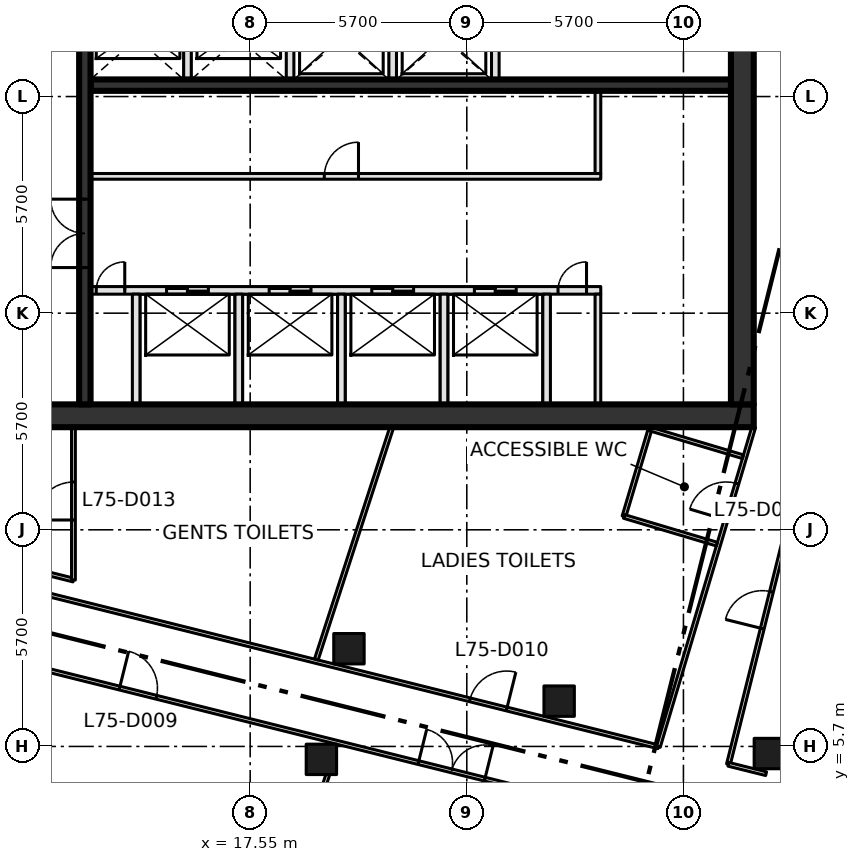
"""IFC4 building model, lengths in metres.
Left out: names, types, materials, properties, quantities, classifications, styles, units other than length and angle.
Written with IfcOpenShell. Run it as: python <this file> out.ifc"""

import sys

from ifc_helpers import new_model, si_unit, direction, frame, frame_2d, origin, origin_2d, place, context, subcontext, project, spatial, rectangle, extrude, element, fill, save


model = new_model("IFC4")
c1 = context("Model", 3, precision=1e-05, world=origin(), true_north=direction((0.0, 1.0)))
c2 = subcontext(c1, "Body", "Model", "MODEL_VIEW")
j1 = project(units=[si_unit("LENGTHUNIT", "METRE"), si_unit("PLANEANGLEUNIT", "RADIAN")], contexts=[c1])
p1 = place(None, origin())
s1 = spatial("IfcSite", under=j1, at=p1, CompositionType="ELEMENT")
p2 = place(p1, origin())
s2 = spatial("IfcBuilding", under=s1, at=p2, CompositionType="ELEMENT")
p3 = place(p2, frame((0.0, 0.0, 327.6)))
s3 = spatial("IfcBuildingStorey", under=s2, at=p3, CompositionType="ELEMENT", Elevation=327.6)
for number, where, z_axis, x_axis in (
    (1, (19.424, 5.36, 0.0), (0.0, 0.0, 1.0), (1.0, 0.0, 0.0)),
    (2, (20.149, 8.271, 0.0), (0.0, 0.0, 1.0), (1.0, 0.0, 0.0)),
    (3, (25.68, 6.892, 0.0), (0.0, 0.0, 1.0), (1.0, 0.0, 0.0)),
    (4, (31.211, 5.513, 0.0), (0.0, 0.0, 1.0), (1.0, 0.0, 0.0)),
):
    element("IfcColumn", number, at=place(p3, frame(where, z_axis=z_axis, x_axis=x_axis)), inside=s3, PredefinedType="COLUMN", context=c2, shape_type="SweptSolid", body=[
        extrude(rectangle(XDim=0.8, YDim=0.8, at=origin_2d()), origin(), (0.0, 0.0, 1.0), 4.2),
    ])
p4 = place(p3, frame((8.0, 14.4, -0.3), z_axis=(0.0, 0.0, 1.0), x_axis=(1.0, 0.0, 0.0)))
e5 = element("IfcWall", 5, at=p4, inside=s3, PredefinedType="SHEAR", context=c2, shape_type="SweptSolid", body=[
    extrude(rectangle(XDim=22.8, YDim=0.6, at=frame_2d((11.4, 0.0))), origin(), (0.0, 0.0, 1.0), 4.2),
])
p5 = place(p4, frame((2.3, 0.0, 0.3)))
e6 = element("IfcOpeningElement", 6, at=p5, cuts=e5, PredefinedType="OPENING", context=c2, shape_type="SweptSolid", body=[
    extrude(rectangle(XDim=1.8, YDim=2.1, at=frame_2d((0.9, 1.05))), frame((0.0, 0.31, 0.0), z_axis=(0.0, -1.0, 0.0), x_axis=(1.0, 0.0, 0.0)), (0.0, 0.0, 1.0), 0.62),
])
p6 = place(p3, frame((30.5, 14.7, -0.3), z_axis=(0.0, 0.0, 1.0), x_axis=(0.0, 1.0, 0.0)))
e7 = element("IfcWall", 7, at=p6, inside=s3, PredefinedType="SHEAR", context=c2, shape_type="SweptSolid", body=[
    extrude(rectangle(XDim=21.0, YDim=0.6, at=frame_2d((10.5, 0.0))), origin(), (0.0, 0.0, 1.0), 4.2),
])
p7 = place(p3, frame((13.35, 17.7, 0.0), z_axis=(0.0, 0.0, 1.0), x_axis=(1.0, 0.0, 0.0)))
e8 = element("IfcWall", 8, at=p7, inside=s3, PredefinedType="SOLIDWALL", context=c2, shape_type="SweptSolid", body=[
    extrude(rectangle(XDim=13.425, YDim=0.2, at=frame_2d((6.712, 0.0))), origin(), (0.0, 0.0, 1.0), 3.9),
])
p8 = place(p7, frame((2.0, 0.0, 0.0)))
e9 = element("IfcOpeningElement", 9, at=p8, cuts=e8, PredefinedType="OPENING", context=c2, shape_type="SweptSolid", body=[
    extrude(rectangle(XDim=1.1, YDim=2.1, at=frame_2d((0.55, 1.05))), frame((0.0, 0.11, 0.0), z_axis=(0.0, -1.0, 0.0), x_axis=(1.0, 0.0, 0.0)), (0.0, 0.0, 1.0), 0.22),
])
p9 = place(p7, frame((4.7, 0.0, 0.0)))
e10 = element("IfcOpeningElement", 10, at=p9, cuts=e8, PredefinedType="OPENING", context=c2, shape_type="SweptSolid", body=[
    extrude(rectangle(XDim=1.1, YDim=2.1, at=frame_2d((0.55, 1.05))), frame((0.0, 0.11, 0.0), z_axis=(0.0, -1.0, 0.0), x_axis=(1.0, 0.0, 0.0)), (0.0, 0.0, 1.0), 0.22),
])
p10 = place(p7, frame((7.4, 0.0, 0.0)))
e11 = element("IfcOpeningElement", 11, at=p10, cuts=e8, PredefinedType="OPENING", context=c2, shape_type="SweptSolid", body=[
    extrude(rectangle(XDim=1.1, YDim=2.1, at=frame_2d((0.55, 1.05))), frame((0.0, 0.11, 0.0), z_axis=(0.0, -1.0, 0.0), x_axis=(1.0, 0.0, 0.0)), (0.0, 0.0, 1.0), 0.22),
])
p11 = place(p7, frame((10.1, 0.0, 0.0)))
e12 = element("IfcOpeningElement", 12, at=p11, cuts=e8, PredefinedType="OPENING", context=c2, shape_type="SweptSolid", body=[
    extrude(rectangle(XDim=1.1, YDim=2.1, at=frame_2d((0.55, 1.05))), frame((0.0, 0.11, 0.0), z_axis=(0.0, -1.0, 0.0), x_axis=(1.0, 0.0, 0.0)), (0.0, 0.0, 1.0), 0.22),
])
p12 = place(p7, frame((0.15, 0.0, 0.0)))
e13 = element("IfcOpeningElement", 13, at=p12, cuts=e8, PredefinedType="OPENING", context=c2, shape_type="SweptSolid", body=[
    extrude(rectangle(XDim=0.75, YDim=2.1, at=frame_2d((0.375, 1.05))), frame((0.0, 0.11, 0.0), z_axis=(0.0, -1.0, 0.0), x_axis=(1.0, 0.0, 0.0)), (0.0, 0.0, 1.0), 0.22),
])
p13 = place(p7, frame((12.3, 0.0, 0.0)))
e14 = element("IfcOpeningElement", 14, at=p13, cuts=e8, PredefinedType="OPENING", context=c2, shape_type="SweptSolid", body=[
    extrude(rectangle(XDim=0.75, YDim=2.1, at=frame_2d((0.375, 1.05))), frame((0.0, 0.11, 0.0), z_axis=(0.0, -1.0, 0.0), x_axis=(1.0, 0.0, 0.0)), (0.0, 0.0, 1.0), 0.22),
])
p14 = place(p3, frame((13.35, 20.7, 0.0), z_axis=(0.0, 0.0, 1.0), x_axis=(1.0, 0.0, 0.0)))
e15 = element("IfcWall", 15, at=p14, inside=s3, PredefinedType="PARTITIONING", context=c2, shape_type="SweptSolid", body=[
    extrude(rectangle(XDim=13.425, YDim=0.15, at=frame_2d((6.712, 0.0))), origin(), (0.0, 0.0, 1.0), 3.9),
])
p15 = place(p14, frame((6.15, 0.0, 0.0)))
e16 = element("IfcOpeningElement", 16, at=p15, cuts=e15, PredefinedType="OPENING", context=c2, shape_type="SweptSolid", body=[
    extrude(rectangle(XDim=0.9, YDim=2.1, at=frame_2d((0.45, 1.05))), frame((0.0, 0.085, 0.0), z_axis=(0.0, -1.0, 0.0), x_axis=(1.0, 0.0, 0.0)), (0.0, 0.0, 1.0), 0.17),
])
p16 = place(p3, frame((13.35, 23.1, 0.0), z_axis=(0.0, 0.0, 1.0), x_axis=(1.0, 0.0, 0.0)))
e17 = element("IfcWall", 17, at=p16, inside=s3, PredefinedType="SHEAR", context=c2, shape_type="SweptSolid", body=[
    extrude(rectangle(XDim=16.85, YDim=0.3, at=frame_2d((8.425, 0.0))), origin(), (0.0, 0.0, 1.0), 3.9),
])
p17 = place(p3, frame((13.2, 14.7, 0.0), z_axis=(0.0, 0.0, 1.0), x_axis=(0.0, 1.0, 0.0)))
e18 = element("IfcWall", 18, at=p17, inside=s3, PredefinedType="SHEAR", context=c2, shape_type="SweptSolid", body=[
    extrude(rectangle(XDim=21.0, YDim=0.3, at=frame_2d((10.5, 0.0))), origin(), (0.0, 0.0, 1.0), 3.9),
])
p18 = place(p17, frame((3.6, 0.0, 0.0)))
e19 = element("IfcOpeningElement", 19, at=p18, cuts=e18, PredefinedType="OPENING", context=c2, shape_type="SweptSolid", body=[
    extrude(rectangle(XDim=1.8, YDim=2.1, at=frame_2d((0.9, 1.05))), frame((0.0, 0.16, 0.0), z_axis=(0.0, -1.0, 0.0), x_axis=(1.0, 0.0, 0.0)), (0.0, 0.0, 1.0), 0.32),
])
p19 = place(p17, frame((11.7, 0.0, 0.0)))
e20 = element("IfcOpeningElement", 20, at=p19, cuts=e18, PredefinedType="OPENING", context=c2, shape_type="SweptSolid", body=[
    extrude(rectangle(XDim=1.2, YDim=2.1, at=frame_2d((0.6, 1.05))), frame((0.0, 0.16, 0.0), z_axis=(0.0, -1.0, 0.0), x_axis=(1.0, 0.0, 0.0)), (0.0, 0.0, 1.0), 0.32),
])
p20 = place(p3, frame((14.55, 14.7, 0.0), z_axis=(0.0, 0.0, 1.0), x_axis=(0.0, 1.0, 0.0)))
e21 = element("IfcWall", 21, at=p20, inside=s3, PredefinedType="SOLIDWALL", context=c2, shape_type="SweptSolid", body=[
    extrude(rectangle(XDim=2.9, YDim=0.2, at=frame_2d((1.45, 0.0))), origin(), (0.0, 0.0, 1.0), 3.9),
])
p21 = place(p3, frame((15.9, 23.25, 0.0), z_axis=(0.0, 0.0, 1.0), x_axis=(0.0, 1.0, 0.0)))
e22 = element("IfcWall", 22, at=p21, inside=s3, PredefinedType="SOLIDWALL", context=c2, shape_type="SweptSolid", body=[
    extrude(rectangle(XDim=2.15, YDim=0.2, at=frame_2d((1.075, 0.0))), origin(), (0.0, 0.0, 1.0), 3.9),
])
p22 = place(p3, frame((17.25, 14.7, 0.0), z_axis=(0.0, 0.0, 1.0), x_axis=(0.0, 1.0, 0.0)))
e23 = element("IfcWall", 23, at=p22, inside=s3, PredefinedType="SOLIDWALL", context=c2, shape_type="SweptSolid", body=[
    extrude(rectangle(XDim=2.9, YDim=0.2, at=frame_2d((1.45, 0.0))), origin(), (0.0, 0.0, 1.0), 3.9),
])
p23 = place(p3, frame((18.6, 23.25, 0.0), z_axis=(0.0, 0.0, 1.0), x_axis=(0.0, 1.0, 0.0)))
e24 = element("IfcWall", 24, at=p23, inside=s3, PredefinedType="SOLIDWALL", context=c2, shape_type="SweptSolid", body=[
    extrude(rectangle(XDim=5.15, YDim=0.2, at=frame_2d((2.575, 0.0))), origin(), (0.0, 0.0, 1.0), 3.9),
])
p24 = place(p23, frame((3.15, 0.0, 0.0)))
e25 = element("IfcOpeningElement", 25, at=p24, cuts=e24, PredefinedType="OPENING", context=c2, shape_type="SweptSolid", body=[
    extrude(rectangle(XDim=1.2, YDim=2.1, at=frame_2d((0.6, 1.05))), frame((0.0, 0.11, 0.0), z_axis=(0.0, -1.0, 0.0), x_axis=(1.0, 0.0, 0.0)), (0.0, 0.0, 1.0), 0.22),
])
p25 = place(p3, frame((19.95, 14.7, 0.0), z_axis=(0.0, 0.0, 1.0), x_axis=(0.0, 1.0, 0.0)))
e26 = element("IfcWall", 26, at=p25, inside=s3, PredefinedType="SOLIDWALL", context=c2, shape_type="SweptSolid", body=[
    extrude(rectangle(XDim=2.9, YDim=0.2, at=frame_2d((1.45, 0.0))), origin(), (0.0, 0.0, 1.0), 3.9),
])
p26 = place(p3, frame((21.3, 23.25, 0.0), z_axis=(0.0, 0.0, 1.0), x_axis=(0.0, 1.0, 0.0)))
e27 = element("IfcWall", 27, at=p26, inside=s3, PredefinedType="SOLIDWALL", context=c2, shape_type="SweptSolid", body=[
    extrude(rectangle(XDim=2.15, YDim=0.2, at=frame_2d((1.075, 0.0))), origin(), (0.0, 0.0, 1.0), 3.9),
])
p27 = place(p3, frame((22.65, 14.7, 0.0), z_axis=(0.0, 0.0, 1.0), x_axis=(0.0, 1.0, 0.0)))
e28 = element("IfcWall", 28, at=p27, inside=s3, PredefinedType="SOLIDWALL", context=c2, shape_type="SweptSolid", body=[
    extrude(rectangle(XDim=2.9, YDim=0.2, at=frame_2d((1.45, 0.0))), origin(), (0.0, 0.0, 1.0), 3.9),
])
p28 = place(p3, frame((24.0, 23.25, 0.0), z_axis=(0.0, 0.0, 1.0), x_axis=(0.0, 1.0, 0.0)))
e29 = element("IfcWall", 29, at=p28, inside=s3, PredefinedType="SOLIDWALL", context=c2, shape_type="SweptSolid", body=[
    extrude(rectangle(XDim=2.15, YDim=0.2, at=frame_2d((1.075, 0.0))), origin(), (0.0, 0.0, 1.0), 3.9),
])
p29 = place(p3, frame((25.35, 14.7, 0.0), z_axis=(0.0, 0.0, 1.0), x_axis=(0.0, 1.0, 0.0)))
e30 = element("IfcWall", 30, at=p29, inside=s3, PredefinedType="SOLIDWALL", context=c2, shape_type="SweptSolid", body=[
    extrude(rectangle(XDim=2.9, YDim=0.2, at=frame_2d((1.45, 0.0))), origin(), (0.0, 0.0, 1.0), 3.9),
])
p30 = place(p3, frame((26.7, 14.7, 0.0), z_axis=(0.0, 0.0, 1.0), x_axis=(0.0, 1.0, 0.0)))
e31 = element("IfcWall", 31, at=p30, inside=s3, PredefinedType="PARTITIONING", context=c2, shape_type="SweptSolid", body=[
    extrude(rectangle(XDim=2.9, YDim=0.15, at=frame_2d((1.45, 0.0))), origin(), (0.0, 0.0, 1.0), 3.9),
])
p31 = place(p3, frame((26.7, 20.775, 0.0), z_axis=(0.0, 0.0, 1.0), x_axis=(0.0, 1.0, 0.0)))
e32 = element("IfcWall", 32, at=p31, inside=s3, PredefinedType="PARTITIONING", context=c2, shape_type="SweptSolid", body=[
    extrude(rectangle(XDim=2.175, YDim=0.15, at=frame_2d((1.087, 0.0))), origin(), (0.0, 0.0, 1.0), 3.9),
])
p32 = place(p3, frame((8.601, 8.61, 0.0), z_axis=(0.0, 0.0, 1.0), x_axis=(0.970290921205, -0.241941166872, 0.0)))
e33 = element("IfcWall", 33, at=p32, inside=s3, PredefinedType="PARTITIONING", context=c2, shape_type="SweptSolid", body=[
    extrude(rectangle(XDim=19.812, YDim=0.1, at=frame_2d((9.906, 0.0))), origin(), (0.0, 0.0, 1.0), 3.9),
])
p33 = place(p32, frame((13.785, 0.0, 0.0)))
e34 = element("IfcOpeningElement", 34, at=p33, cuts=e33, PredefinedType="OPENING", context=c2, shape_type="SweptSolid", body=[
    extrude(rectangle(XDim=1.8, YDim=2.1, at=frame_2d((0.9, 1.05))), frame((0.0, 0.06, 0.0), z_axis=(0.0, -1.0, 0.0), x_axis=(1.0, 0.0, 0.0)), (0.0, 0.0, 1.0), 0.12),
])
p34 = place(p32, frame((5.68, 0.0, 0.0)))
e35 = element("IfcOpeningElement", 35, at=p34, cuts=e33, PredefinedType="OPENING", context=c2, shape_type="SweptSolid", body=[
    extrude(rectangle(XDim=1.0, YDim=2.1, at=frame_2d((0.5, 1.05))), frame((0.0, 0.06, 0.0), z_axis=(0.0, -1.0, 0.0), x_axis=(1.0, 0.0, 0.0)), (0.0, 0.0, 1.0), 0.12),
])
p35 = place(p3, frame((9.002, 10.499, 0.0), z_axis=(0.0, 0.0, 1.0), x_axis=(0.970298340477, -0.241911410372, 0.0)))
e36 = element("IfcWall", 36, at=p35, inside=s3, PredefinedType="PARTITIONING", context=c2, shape_type="SweptSolid", body=[
    extrude(rectangle(XDim=19.88, YDim=0.1, at=frame_2d((9.94, 0.0))), origin(), (0.0, 0.0, 1.0), 3.9),
])
p36 = place(p35, frame((14.766, 0.0, 0.0)))
e37 = element("IfcOpeningElement", 37, at=p36, cuts=e36, PredefinedType="OPENING", context=c2, shape_type="SweptSolid", body=[
    extrude(rectangle(XDim=1.0, YDim=2.1, at=frame_2d((0.5, 1.05))), frame((0.0, 0.06, 0.0), z_axis=(0.0, -1.0, 0.0), x_axis=(1.0, 0.0, 0.0)), (0.0, 0.0, 1.0), 0.12),
])
p37 = place(p3, frame((9.9, 10.826, 0.0), z_axis=(0.0, 0.0, 1.0), x_axis=(0.970290953223, -0.241941038466, 0.0)))
e38 = element("IfcWall", 38, at=p37, inside=s3, PredefinedType="PARTITIONING", context=c2, shape_type="SweptSolid", body=[
    extrude(rectangle(XDim=3.092, YDim=0.1, at=frame_2d((1.546, 0.0))), origin(), (0.0, 0.0, 1.0), 3.9),
])
p38 = place(p3, frame((12.9, 10.078, 0.0), z_axis=(0.0, 0.0, 1.0), x_axis=(0.0, 1.0, 0.0)))
e39 = element("IfcWall", 39, at=p38, inside=s3, PredefinedType="PARTITIONING", context=c2, shape_type="SweptSolid", body=[
    extrude(rectangle(XDim=4.022, YDim=0.1, at=frame_2d((2.011, 0.0))), origin(), (0.0, 0.0, 1.0), 3.9),
])
p39 = place(p38, frame((1.58, 0.0, 0.0)))
e40 = element("IfcOpeningElement", 40, at=p39, cuts=e39, PredefinedType="OPENING", context=c2, shape_type="SweptSolid", body=[
    extrude(rectangle(XDim=1.0, YDim=2.1, at=frame_2d((0.5, 1.05))), frame((0.0, 0.06, 0.0), z_axis=(0.0, -1.0, 0.0), x_axis=(1.0, 0.0, 0.0)), (0.0, 0.0, 1.0), 0.12),
])
p40 = place(p3, frame((28.291, 5.69, 0.0), z_axis=(0.0, 0.0, 1.0), x_axis=(0.28588265334, 0.958264633867, 0.0)))
e41 = element("IfcWall", 41, at=p40, inside=s3, PredefinedType="PARTITIONING", context=c2, shape_type="SweptSolid", body=[
    extrude(rectangle(XDim=8.776, YDim=0.1, at=frame_2d((4.388, 0.0))), origin(), (0.0, 0.0, 1.0), 3.9),
])
p41 = place(p40, frame((6.23, 0.0, 0.0)))
e42 = element("IfcOpeningElement", 42, at=p41, cuts=e41, PredefinedType="OPENING", context=c2, shape_type="SweptSolid", body=[
    extrude(rectangle(XDim=1.0, YDim=2.1, at=frame_2d((0.5, 1.05))), frame((0.0, 0.06, 0.0), z_axis=(0.0, -1.0, 0.0), x_axis=(1.0, 0.0, 0.0)), (0.0, 0.0, 1.0), 0.12),
])
p42 = place(p3, frame((30.134, 5.23, 0.0), z_axis=(0.0, 0.0, 1.0), x_axis=(0.24199734369, 0.970276911839, 0.0)))
e43 = element("IfcWall", 43, at=p42, inside=s3, PredefinedType="PARTITIONING", context=c2, shape_type="SweptSolid", body=[
    extrude(rectangle(XDim=8.111, YDim=0.1, at=frame_2d((4.056, 0.0))), origin(), (0.0, 0.0, 1.0), 3.9),
])
p43 = place(p42, frame((3.68, 0.0, 0.0)))
e44 = element("IfcOpeningElement", 44, at=p43, cuts=e43, PredefinedType="OPENING", context=c2, shape_type="SweptSolid", body=[
    extrude(rectangle(XDim=1.0, YDim=2.1, at=frame_2d((0.5, 1.05))), frame((0.0, 0.06, 0.0), z_axis=(0.0, -1.0, 0.0), x_axis=(1.0, 0.0, 0.0)), (0.0, 0.0, 1.0), 0.12),
])
p44 = place(p3, frame((31.125, 4.983, 0.0), z_axis=(0.0, 0.0, 1.0), x_axis=(-0.970296981152, 0.24191686251, 0.0)))
e45 = element("IfcWall", 45, at=p44, inside=s3, PredefinedType="PARTITIONING", context=c2, shape_type="SweptSolid", body=[
    extrude(rectangle(XDim=1.021, YDim=0.1, at=frame_2d((0.511, 0.0))), origin(), (0.0, 0.0, 1.0), 3.9),
])
p45 = place(p3, frame((16.93, -3.238, 0.0), z_axis=(0.0, 0.0, 1.0), x_axis=(0.308953497737, 0.95107714526, 0.0)))
e46 = element("IfcWall", 46, at=p45, inside=s3, PredefinedType="PARTITIONING", context=c2, shape_type="SweptSolid", body=[
    extrude(rectangle(XDim=8.62, YDim=0.1, at=frame_2d((4.31, 0.0))), origin(), (0.0, 0.0, 1.0), 3.9),
])
p46 = place(p3, frame((19.291, 7.989, 0.0), z_axis=(0.0, 0.0, 1.0), x_axis=(0.308911656913, 0.951090736062, 0.0)))
e47 = element("IfcWall", 47, at=p46, inside=s3, PredefinedType="PARTITIONING", context=c2, shape_type="SweptSolid", body=[
    extrude(rectangle(XDim=6.425, YDim=0.1, at=frame_2d((3.213, 0.0))), origin(), (0.0, 0.0, 1.0), 3.9),
])
p47 = place(p3, frame((27.386, 11.752, 0.0), z_axis=(0.0, 0.0, 1.0), x_axis=(0.285826425332, 0.958281406781, 0.0)))
e48 = element("IfcWall", 48, at=p47, inside=s3, PredefinedType="PARTITIONING", context=c2, shape_type="SweptSolid", body=[
    extrude(rectangle(XDim=2.4, YDim=0.1, at=frame_2d((1.2, 0.0))), origin(), (0.0, 0.0, 1.0), 3.9),
])
for number, where, z_axis, x_axis in (
    (49, (28.072, 14.052, 0.0), (0.0, 0.0, 1.0), (0.958, -0.286, 0.0)),
    (50, (29.83, 11.023, 0.0), (0.0, 0.0, 1.0), (-0.958, 0.286, 0.0)),
):
    element("IfcWall", number, at=place(p3, frame(where, z_axis=z_axis, x_axis=x_axis)), inside=s3, PredefinedType="PARTITIONING", context=c2, shape_type="SweptSolid", body=[
        extrude(rectangle(XDim=2.551, YDim=0.1, at=frame_2d((1.275, 0.0))), origin(), (0.0, 0.0, 1.0), 3.9),
    ])
p48 = place(p8, origin())
e51 = element("IfcDoor", 51, at=p48, inside=s3, OperationType="SLIDING_TO_LEFT", PredefinedType="DOOR", context=c2, shape_type="SweptSolid", body=[
    extrude(rectangle(XDim=1.1, YDim=2.1, at=frame_2d((0.55, 1.05))), frame((0.0, 0.025, 0.0), z_axis=(0.0, -1.0, 0.0), x_axis=(1.0, 0.0, 0.0)), (0.0, 0.0, 1.0), 0.05),
])
fill(e9, e51)
p49 = place(p9, origin())
e52 = element("IfcDoor", 52, at=p49, inside=s3, OperationType="SLIDING_TO_LEFT", PredefinedType="DOOR", context=c2, shape_type="SweptSolid", body=[
    extrude(rectangle(XDim=1.1, YDim=2.1, at=frame_2d((0.55, 1.05))), frame((0.0, 0.025, 0.0), z_axis=(0.0, -1.0, 0.0), x_axis=(1.0, 0.0, 0.0)), (0.0, 0.0, 1.0), 0.05),
])
fill(e10, e52)
p50 = place(p10, origin())
e53 = element("IfcDoor", 53, at=p50, inside=s3, OperationType="SLIDING_TO_LEFT", PredefinedType="DOOR", context=c2, shape_type="SweptSolid", body=[
    extrude(rectangle(XDim=1.1, YDim=2.1, at=frame_2d((0.55, 1.05))), frame((0.0, 0.025, 0.0), z_axis=(0.0, -1.0, 0.0), x_axis=(1.0, 0.0, 0.0)), (0.0, 0.0, 1.0), 0.05),
])
fill(e11, e53)
p51 = place(p11, origin())
e54 = element("IfcDoor", 54, at=p51, inside=s3, OperationType="SLIDING_TO_LEFT", PredefinedType="DOOR", context=c2, shape_type="SweptSolid", body=[
    extrude(rectangle(XDim=1.1, YDim=2.1, at=frame_2d((0.55, 1.05))), frame((0.0, 0.025, 0.0), z_axis=(0.0, -1.0, 0.0), x_axis=(1.0, 0.0, 0.0)), (0.0, 0.0, 1.0), 0.05),
])
fill(e12, e54)
p52 = place(p12, origin())
e55 = element("IfcDoor", 55, at=p52, inside=s3, OperationType="SINGLE_SWING_RIGHT", PredefinedType="DOOR", context=c2, shape_type="SweptSolid", body=[
    extrude(rectangle(XDim=0.75, YDim=2.1, at=frame_2d((0.375, 1.05))), frame((0.0, 0.025, 0.0), z_axis=(0.0, -1.0, 0.0), x_axis=(1.0, 0.0, 0.0)), (0.0, 0.0, 1.0), 0.05),
])
fill(e13, e55)
p53 = place(p13, origin())
e56 = element("IfcDoor", 56, at=p53, inside=s3, OperationType="SINGLE_SWING_RIGHT", PredefinedType="DOOR", context=c2, shape_type="SweptSolid", body=[
    extrude(rectangle(XDim=0.75, YDim=2.1, at=frame_2d((0.375, 1.05))), frame((0.0, 0.025, 0.0), z_axis=(0.0, -1.0, 0.0), x_axis=(1.0, 0.0, 0.0)), (0.0, 0.0, 1.0), 0.05),
])
fill(e14, e56)
p54 = place(p15, origin())
e57 = element("IfcDoor", 57, at=p54, inside=s3, OperationType="SINGLE_SWING_RIGHT", PredefinedType="DOOR", context=c2, shape_type="SweptSolid", body=[
    extrude(rectangle(XDim=0.9, YDim=2.1, at=frame_2d((0.45, 1.05))), frame((0.0, 0.025, 0.0), z_axis=(0.0, -1.0, 0.0), x_axis=(1.0, 0.0, 0.0)), (0.0, 0.0, 1.0), 0.05),
])
fill(e16, e57)
p55 = place(p18, origin())
e58 = element("IfcDoor", 58, at=p55, inside=s3, OperationType="DOUBLE_DOOR_SINGLE_SWING", PredefinedType="DOOR", context=c2, shape_type="SweptSolid", body=[
    extrude(rectangle(XDim=1.8, YDim=2.1, at=frame_2d((0.9, 1.05))), frame((0.0, 0.025, 0.0), z_axis=(0.0, -1.0, 0.0), x_axis=(1.0, 0.0, 0.0)), (0.0, 0.0, 1.0), 0.05),
])
fill(e19, e58)
p56 = place(p33, origin())
e59 = element("IfcDoor", 59, at=p56, inside=s3, OperationType="DOUBLE_DOOR_SINGLE_SWING", PredefinedType="DOOR", context=c2, shape_type="SweptSolid", body=[
    extrude(rectangle(XDim=1.8, YDim=2.1, at=frame_2d((0.9, 1.05))), frame((0.0, 0.025, 0.0), z_axis=(0.0, -1.0, 0.0), x_axis=(1.0, 0.0, 0.0)), (0.0, 0.0, 1.0), 0.05),
])
fill(e34, e59)
p57 = place(p34, origin())
e60 = element("IfcDoor", 60, at=p57, inside=s3, OperationType="SINGLE_SWING_LEFT", PredefinedType="DOOR", context=c2, shape_type="SweptSolid", body=[
    extrude(rectangle(XDim=1.0, YDim=2.1, at=frame_2d((0.5, 1.05))), frame((0.0, 0.025, 0.0), z_axis=(0.0, -1.0, 0.0), x_axis=(1.0, 0.0, 0.0)), (0.0, 0.0, 1.0), 0.05),
])
fill(e35, e60)
p58 = place(p36, origin())
e61 = element("IfcDoor", 61, at=p58, inside=s3, OperationType="SINGLE_SWING_RIGHT", PredefinedType="DOOR", context=c2, shape_type="SweptSolid", body=[
    extrude(rectangle(XDim=1.0, YDim=2.1, at=frame_2d((0.5, 1.05))), frame((0.0, 0.025, 0.0), z_axis=(0.0, -1.0, 0.0), x_axis=(1.0, 0.0, 0.0)), (0.0, 0.0, 1.0), 0.05),
])
fill(e37, e61)
p59 = place(p43, origin())
e62 = element("IfcDoor", 62, at=p59, inside=s3, OperationType="SINGLE_SWING_LEFT", PredefinedType="DOOR", context=c2, shape_type="SweptSolid", body=[
    extrude(rectangle(XDim=1.0, YDim=2.1, at=frame_2d((0.5, 1.05))), frame((0.0, 0.025, 0.0), z_axis=(0.0, -1.0, 0.0), x_axis=(1.0, 0.0, 0.0)), (0.0, 0.0, 1.0), 0.05),
])
fill(e44, e62)
p60 = place(p39, origin())
e63 = element("IfcDoor", 63, at=p60, inside=s3, OperationType="SINGLE_SWING_LEFT", PredefinedType="DOOR", context=c2, shape_type="SweptSolid", body=[
    extrude(rectangle(XDim=1.0, YDim=2.1, at=frame_2d((0.5, 1.05))), frame((0.0, 0.025, 0.0), z_axis=(0.0, -1.0, 0.0), x_axis=(1.0, 0.0, 0.0)), (0.0, 0.0, 1.0), 0.05),
])
fill(e40, e63)
p61 = place(p41, origin())
e64 = element("IfcDoor", 64, at=p61, inside=s3, OperationType="SINGLE_SWING_LEFT", PredefinedType="DOOR", context=c2, shape_type="SweptSolid", body=[
    extrude(rectangle(XDim=1.0, YDim=2.1, at=frame_2d((0.5, 1.05))), frame((0.0, 0.025, 0.0), z_axis=(0.0, -1.0, 0.0), x_axis=(1.0, 0.0, 0.0)), (0.0, 0.0, 1.0), 0.05),
])
fill(e42, e64)
save(model, sys.argv[1])
